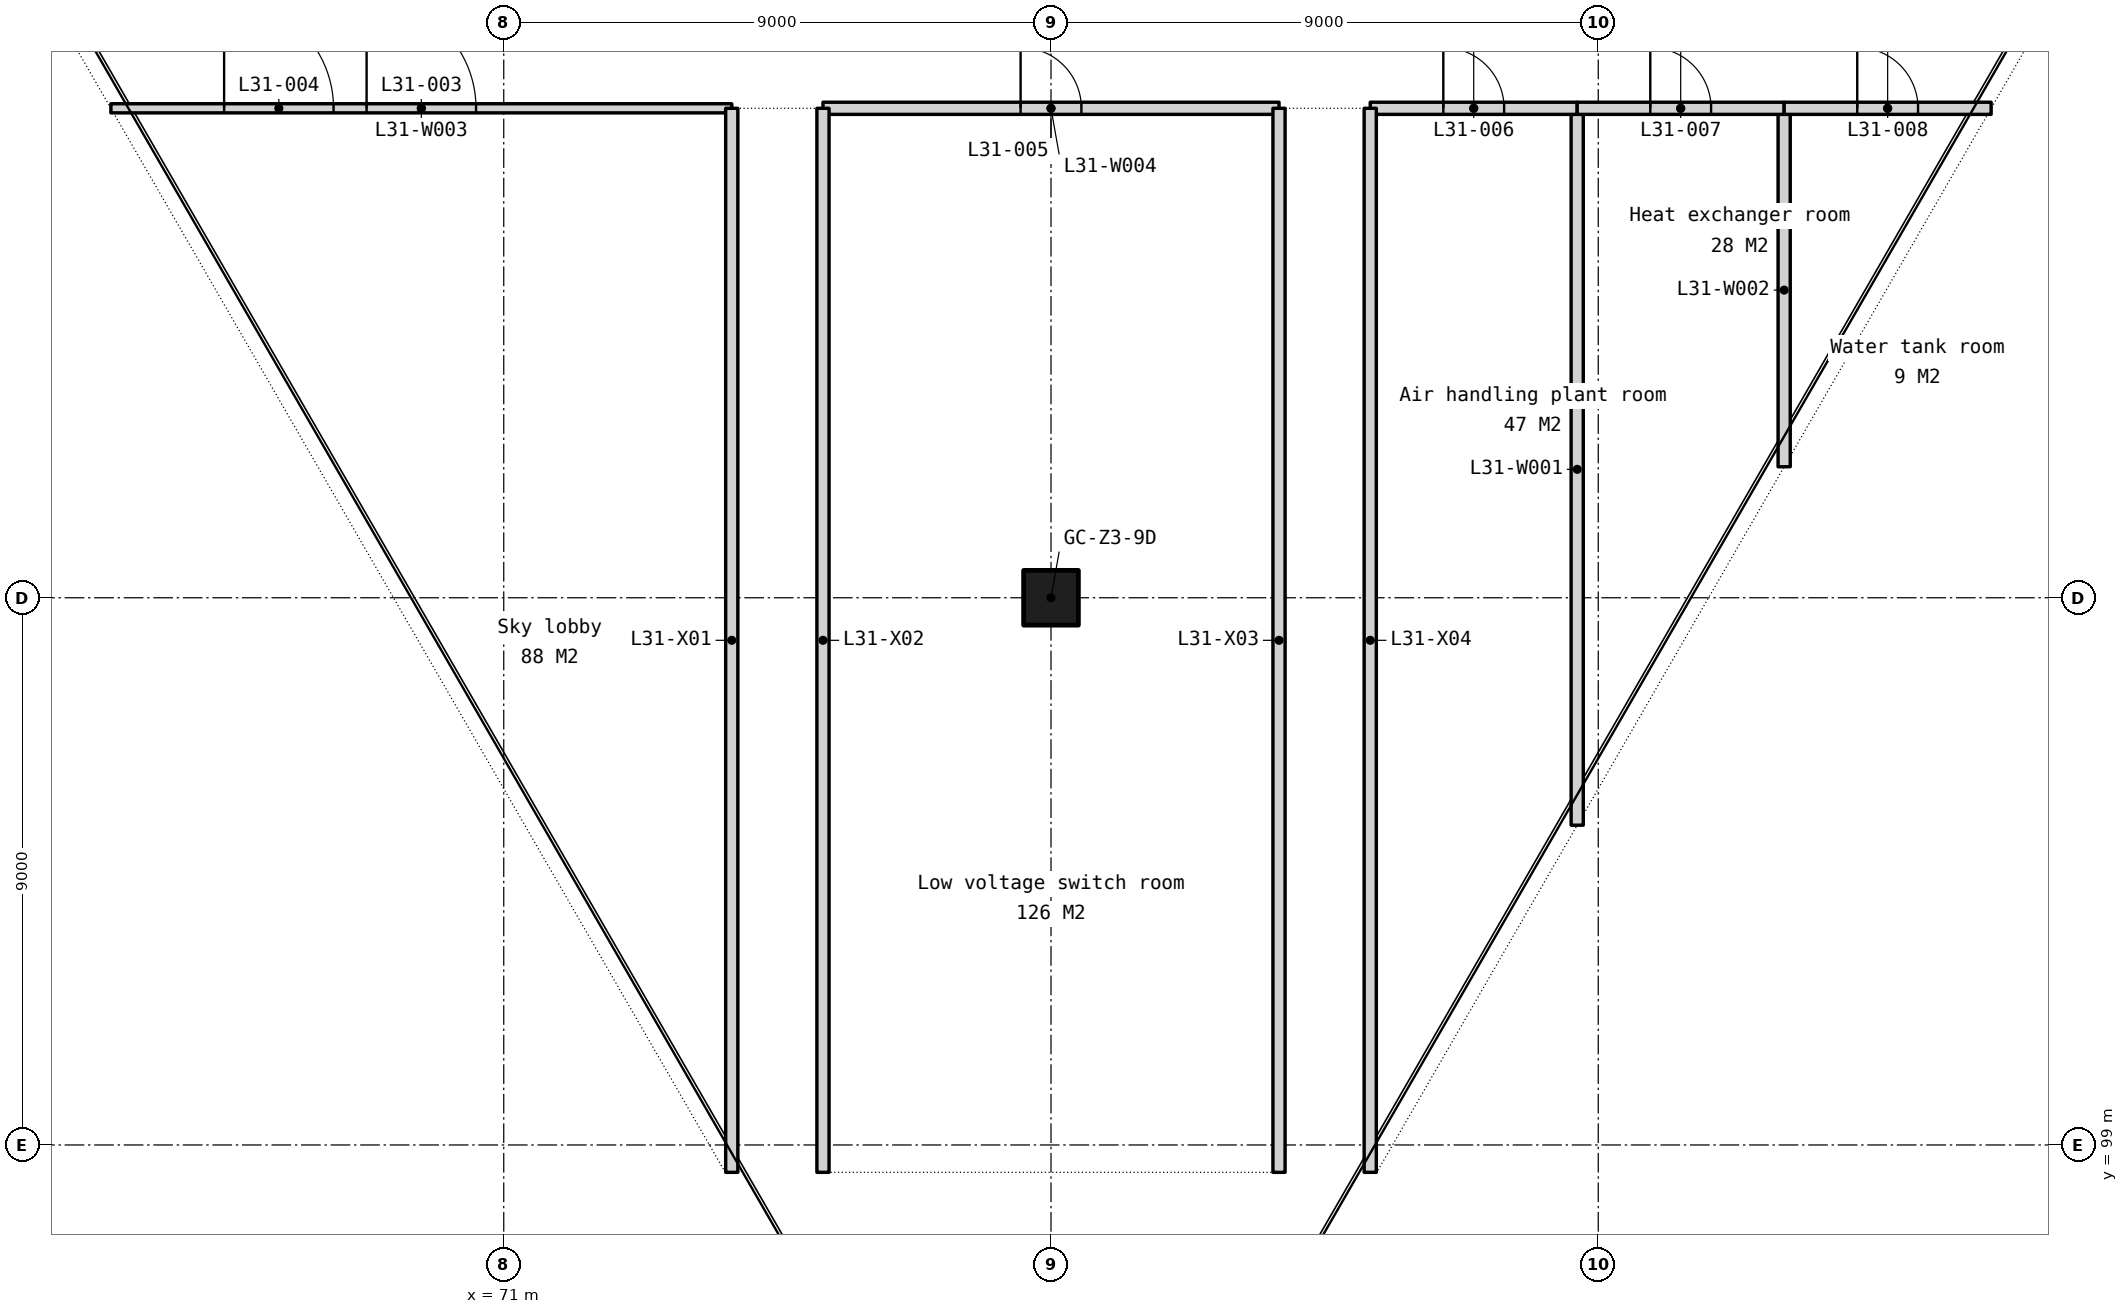
"""IFC4 building model, lengths in metres.
Left out: names, types, materials, properties, quantities, classifications, styles, units other than length and angle.
Written with IfcOpenShell. Run it as: python <this file> out.ifc"""

import sys

from ifc_helpers import new_model, si_unit, direction, frame, frame_2d, origin, origin_2d, place, context, subcontext, project, spatial, rectangle, extrude, element, fill, save


model = new_model("IFC4")
c1 = context("Model", 3, precision=1e-05, world=origin(), true_north=direction((0.0, 1.0)))
c2 = subcontext(c1, "Body", "Model", "MODEL_VIEW")
j1 = project(units=[si_unit("LENGTHUNIT", "METRE"), si_unit("PLANEANGLEUNIT", "RADIAN")], contexts=[c1])
p1 = place(None, origin())
s1 = spatial("IfcSite", under=j1, at=p1, CompositionType="ELEMENT")
p2 = place(p1, origin())
s2 = spatial("IfcBuilding", under=s1, at=p2, CompositionType="ELEMENT")
p3 = place(p2, frame((0.0, 0.0, 123.8)))
s3 = spatial("IfcBuildingStorey", under=s2, at=p3, CompositionType="ELEMENT", Elevation=123.8)
p4 = place(p3, frame((80.0, 108.0, 0.0), z_axis=(0.0, 0.0, 1.0), x_axis=(1.0, 0.0, 0.0)))
e1 = element("IfcColumn", 1, at=p4, inside=s3, PredefinedType="COLUMN", context=c2, shape_type="SweptSolid", body=[
    extrude(rectangle(XDim=0.9, YDim=0.9, at=origin_2d()), origin(), (0.0, 0.0, 1.0), 4.8),
])
p5 = place(p3, frame((88.654, 104.259, 0.0), z_axis=(0.0, 0.0, 1.0), x_axis=(0.0, 1.0, 0.0)))
e2 = element("IfcWall", 2, at=p5, inside=s3, PredefinedType="PARTITIONING", context=c2, shape_type="SweptSolid", body=[
    extrude(rectangle(XDim=11.706, YDim=0.2, at=frame_2d((5.853, 0.0))), origin(), (0.0, 0.0, 1.0), 4.35),
])
p6 = place(p3, frame((92.057, 110.155, 0.0), z_axis=(0.0, 0.0, 1.0), x_axis=(0.0, 1.0, 0.0)))
e3 = element("IfcWall", 3, at=p6, inside=s3, PredefinedType="PARTITIONING", context=c2, shape_type="SweptSolid", body=[
    extrude(rectangle(XDim=5.811, YDim=0.2, at=frame_2d((2.905, 0.0))), origin(), (0.0, 0.0, 1.0), 4.35),
])
p7 = place(p3, frame((64.539, 116.05, 0.0), z_axis=(0.0, 0.0, 1.0), x_axis=(1.0, 0.0, 0.0)))
e4 = element("IfcWall", 4, at=p7, inside=s3, PredefinedType="PARTITIONING", context=c2, shape_type="SweptSolid", body=[
    extrude(rectangle(XDim=10.211, YDim=0.15, at=frame_2d((5.105, 0.0))), origin(), (0.0, 0.0, 1.0), 4.35),
])
p8 = place(p7, frame((4.206, 0.0, 0.0)))
e5 = element("IfcOpeningElement", 5, at=p8, cuts=e4, PredefinedType="OPENING", context=c2, shape_type="SweptSolid", body=[
    extrude(rectangle(XDim=1.8, YDim=2.1, at=frame_2d((0.9, 1.05))), frame((0.0, 0.085, 0.0), z_axis=(0.0, -1.0, 0.0), x_axis=(1.0, 0.0, 0.0)), (0.0, 0.0, 1.0), 0.17),
])
p9 = place(p7, frame((1.862, 0.0, 0.0)))
e6 = element("IfcOpeningElement", 6, at=p9, cuts=e4, PredefinedType="OPENING", context=c2, shape_type="SweptSolid", body=[
    extrude(rectangle(XDim=1.8, YDim=2.1, at=frame_2d((0.9, 1.05))), frame((0.0, 0.085, 0.0), z_axis=(0.0, -1.0, 0.0), x_axis=(1.0, 0.0, 0.0)), (0.0, 0.0, 1.0), 0.17),
])
p10 = place(p3, frame((76.25, 116.05, 0.0), z_axis=(0.0, 0.0, 1.0), x_axis=(1.0, 0.0, 0.0)))
e7 = element("IfcWall", 7, at=p10, inside=s3, PredefinedType="PARTITIONING", context=c2, shape_type="SweptSolid", body=[
    extrude(rectangle(XDim=7.5, YDim=0.2, at=frame_2d((3.75, 0.0))), origin(), (0.0, 0.0, 1.0), 4.35),
])
p11 = place(p10, frame((3.25, 0.0, 0.0)))
e8 = element("IfcOpeningElement", 8, at=p11, cuts=e7, PredefinedType="OPENING", context=c2, shape_type="SweptSolid", body=[
    extrude(rectangle(XDim=1.0, YDim=2.1, at=frame_2d((0.5, 1.05))), frame((0.0, 0.11, 0.0), z_axis=(0.0, -1.0, 0.0), x_axis=(1.0, 0.0, 0.0)), (0.0, 0.0, 1.0), 0.22),
])
p12 = place(p3, frame((85.25, 116.05, 0.0), z_axis=(0.0, 0.0, 1.0), x_axis=(1.0, 0.0, 0.0)))
e9 = element("IfcWall", 9, at=p12, inside=s3, PredefinedType="PARTITIONING", context=c2, shape_type="SweptSolid", body=[
    extrude(rectangle(XDim=3.404, YDim=0.2, at=frame_2d((1.702, 0.0))), origin(), (0.0, 0.0, 1.0), 4.35),
])
p13 = place(p12, frame((1.202, 0.0, 0.0)))
e10 = element("IfcOpeningElement", 10, at=p13, cuts=e9, PredefinedType="OPENING", context=c2, shape_type="SweptSolid", body=[
    extrude(rectangle(XDim=1.0, YDim=2.1, at=frame_2d((0.5, 1.05))), frame((0.0, 0.11, 0.0), z_axis=(0.0, -1.0, 0.0), x_axis=(1.0, 0.0, 0.0)), (0.0, 0.0, 1.0), 0.22),
])
p14 = place(p3, frame((88.654, 116.05, 0.0), z_axis=(0.0, 0.0, 1.0), x_axis=(1.0, 0.0, 0.0)))
e11 = element("IfcWall", 11, at=p14, inside=s3, PredefinedType="PARTITIONING", context=c2, shape_type="SweptSolid", body=[
    extrude(rectangle(XDim=3.404, YDim=0.2, at=frame_2d((1.702, 0.0))), origin(), (0.0, 0.0, 1.0), 4.35),
])
p15 = place(p14, frame((1.202, 0.0, 0.0)))
e12 = element("IfcOpeningElement", 12, at=p15, cuts=e11, PredefinedType="OPENING", context=c2, shape_type="SweptSolid", body=[
    extrude(rectangle(XDim=1.0, YDim=2.1, at=frame_2d((0.5, 1.05))), frame((0.0, 0.11, 0.0), z_axis=(0.0, -1.0, 0.0), x_axis=(1.0, 0.0, 0.0)), (0.0, 0.0, 1.0), 0.22),
])
p16 = place(p3, frame((92.057, 116.05, 0.0), z_axis=(0.0, 0.0, 1.0), x_axis=(1.0, 0.0, 0.0)))
e13 = element("IfcWall", 13, at=p16, inside=s3, PredefinedType="PARTITIONING", context=c2, shape_type="SweptSolid", body=[
    extrude(rectangle(XDim=3.404, YDim=0.2, at=frame_2d((1.702, 0.0))), origin(), (0.0, 0.0, 1.0), 4.35),
])
p17 = place(p16, frame((1.202, 0.0, 0.0)))
e14 = element("IfcOpeningElement", 14, at=p17, cuts=e13, PredefinedType="OPENING", context=c2, shape_type="SweptSolid", body=[
    extrude(rectangle(XDim=1.0, YDim=2.1, at=frame_2d((0.5, 1.05))), frame((0.0, 0.11, 0.0), z_axis=(0.0, -1.0, 0.0), x_axis=(1.0, 0.0, 0.0)), (0.0, 0.0, 1.0), 0.22),
])
for number, where, z_axis, x_axis in (
    (15, (74.75, 98.55, 0.0), (0.0, 0.0, 1.0), (0.0, 1.0, 0.0)),
    (16, (76.25, 98.55, 0.0), (0.0, 0.0, 1.0), (0.0, 1.0, 0.0)),
    (17, (83.75, 98.55, 0.0), (0.0, 0.0, 1.0), (0.0, 1.0, 0.0)),
    (18, (85.25, 98.55, 0.0), (0.0, 0.0, 1.0), (0.0, 1.0, 0.0)),
):
    element("IfcWall", number, at=place(p3, frame(where, z_axis=z_axis, x_axis=x_axis)), inside=s3, PredefinedType="PARTITIONING", context=c2, shape_type="SweptSolid", body=[
        extrude(rectangle(XDim=17.5, YDim=0.2, at=frame_2d((8.75, 0.0))), origin(), (0.0, 0.0, 1.0), 4.35),
    ])
p18 = place(p8, origin())
e19 = element("IfcDoor", 19, at=p18, inside=s3, OperationType="SINGLE_SWING_LEFT", PredefinedType="DOOR", context=c2, shape_type="SweptSolid", body=[
    extrude(rectangle(XDim=1.8, YDim=2.1, at=frame_2d((0.9, 1.05))), frame((0.0, 0.025, 0.0), z_axis=(0.0, -1.0, 0.0), x_axis=(1.0, 0.0, 0.0)), (0.0, 0.0, 1.0), 0.05),
])
fill(e5, e19)
p19 = place(p9, origin())
e20 = element("IfcDoor", 20, at=p19, inside=s3, OperationType="SINGLE_SWING_LEFT", PredefinedType="DOOR", context=c2, shape_type="SweptSolid", body=[
    extrude(rectangle(XDim=1.8, YDim=2.1, at=frame_2d((0.9, 1.05))), frame((0.0, 0.025, 0.0), z_axis=(0.0, -1.0, 0.0), x_axis=(1.0, 0.0, 0.0)), (0.0, 0.0, 1.0), 0.05),
])
fill(e6, e20)
p20 = place(p11, origin())
e21 = element("IfcDoor", 21, at=p20, inside=s3, OperationType="SINGLE_SWING_LEFT", PredefinedType="DOOR", context=c2, shape_type="SweptSolid", body=[
    extrude(rectangle(XDim=1.0, YDim=2.1, at=frame_2d((0.5, 1.05))), frame((0.0, 0.025, 0.0), z_axis=(0.0, -1.0, 0.0), x_axis=(1.0, 0.0, 0.0)), (0.0, 0.0, 1.0), 0.05),
])
fill(e8, e21)
p21 = place(p13, origin())
e22 = element("IfcDoor", 22, at=p21, inside=s3, OperationType="SINGLE_SWING_LEFT", PredefinedType="DOOR", context=c2, shape_type="SweptSolid", body=[
    extrude(rectangle(XDim=1.0, YDim=2.1, at=frame_2d((0.5, 1.05))), frame((0.0, 0.025, 0.0), z_axis=(0.0, -1.0, 0.0), x_axis=(1.0, 0.0, 0.0)), (0.0, 0.0, 1.0), 0.05),
])
fill(e10, e22)
p22 = place(p15, origin())
e23 = element("IfcDoor", 23, at=p22, inside=s3, OperationType="SINGLE_SWING_LEFT", PredefinedType="DOOR", context=c2, shape_type="SweptSolid", body=[
    extrude(rectangle(XDim=1.0, YDim=2.1, at=frame_2d((0.5, 1.05))), frame((0.0, 0.025, 0.0), z_axis=(0.0, -1.0, 0.0), x_axis=(1.0, 0.0, 0.0)), (0.0, 0.0, 1.0), 0.05),
])
fill(e12, e23)
p23 = place(p17, origin())
e24 = element("IfcDoor", 24, at=p23, inside=s3, OperationType="SINGLE_SWING_LEFT", PredefinedType="DOOR", context=c2, shape_type="SweptSolid", body=[
    extrude(rectangle(XDim=1.0, YDim=2.1, at=frame_2d((0.5, 1.05))), frame((0.0, 0.025, 0.0), z_axis=(0.0, -1.0, 0.0), x_axis=(1.0, 0.0, 0.0)), (0.0, 0.0, 1.0), 0.05),
])
fill(e14, e24)
save(model, sys.argv[1])
